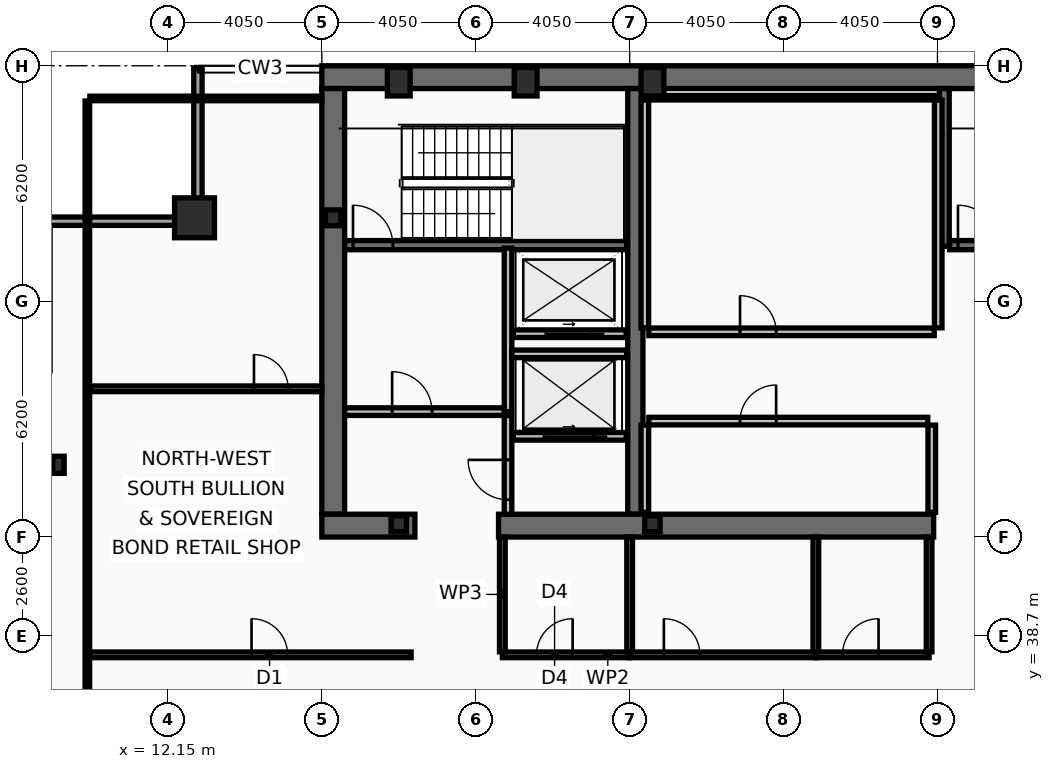
"""IFC4 building model, lengths in metres.
Left out: names, types, materials, properties, quantities, classifications, styles, units other than length and angle.
Written with IfcOpenShell. Run it as: python <this file> out.ifc"""

import sys

from ifc_helpers import new_model, si_unit, direction, frame, frame_2d, origin, origin_2d, place, context, subcontext, project, spatial, rectangle, hollow_rectangle, i_section, extrude, element, fill, save


model = new_model("IFC4")
c1 = context("Model", 3, precision=1e-05, world=origin(), true_north=direction((0.0, 1.0)))
c2 = subcontext(c1, "Body", "Model", "MODEL_VIEW")
j1 = project(units=[si_unit("LENGTHUNIT", "METRE"), si_unit("PLANEANGLEUNIT", "RADIAN")], contexts=[c1])
p1 = place(None, origin())
s1 = spatial("IfcSite", under=j1, at=p1, CompositionType="ELEMENT")
p2 = place(p1, origin())
s2 = spatial("IfcBuilding", under=s1, at=p2, CompositionType="ELEMENT")
p3 = place(p2, frame((0.0, 0.0, 249.8)))
s3 = spatial("IfcBuildingStorey", under=s2, at=p3, CompositionType="ELEMENT", Elevation=249.8)
p4 = place(p3, frame((16.2, 53.4, 0.0), z_axis=(0.0, 0.0, 1.0), x_axis=(1.0, 0.0, 0.0)))
e1 = element("IfcWall", 1, at=p4, inside=s3, PredefinedType="SHEAR", context=c2, shape_type="SweptSolid", body=[
    extrude(rectangle(XDim=40.5, YDim=0.6, at=frame_2d((20.25, 0.0))), origin(), (0.0, 0.0, 1.0), 3.44),
])
p5 = place(p3, frame((16.5, 41.9, 0.0), z_axis=(0.0, 0.0, 1.0), x_axis=(0.0, 1.0, 0.0)))
e2 = element("IfcWall", 2, at=p5, inside=s3, PredefinedType="SHEAR", context=c2, shape_type="SweptSolid", body=[
    extrude(rectangle(XDim=11.2, YDim=0.6, at=frame_2d((5.6, 0.0))), origin(), (0.0, 0.0, 1.0), 3.44),
])
p6 = place(p3, frame((24.45, 41.9, 0.0), z_axis=(0.0, 0.0, 1.0), x_axis=(0.0, 1.0, 0.0)))
e3 = element("IfcWall", 3, at=p6, inside=s3, PredefinedType="SHEAR", context=c2, shape_type="SweptSolid", body=[
    extrude(rectangle(XDim=11.2, YDim=0.4, at=frame_2d((5.6, 0.0))), origin(), (0.0, 0.0, 1.0), 3.44),
])
p7 = place(p3, frame((18.65, 41.6, 0.0), z_axis=(0.0, 0.0, 1.0), x_axis=(-1.0, 0.0, 0.0)))
e4 = element("IfcWall", 4, at=p7, inside=s3, PredefinedType="SHEAR", context=c2, shape_type="SweptSolid", body=[
    extrude(rectangle(XDim=2.45, YDim=0.6, at=frame_2d((1.225, 0.0))), origin(), (0.0, 0.0, 1.0), 3.44),
])
p8 = place(p3, frame((32.3, 41.6, 0.0), z_axis=(0.0, 0.0, 1.0), x_axis=(-1.0, 0.0, 0.0)))
e5 = element("IfcWall", 5, at=p8, inside=s3, PredefinedType="SHEAR", context=c2, shape_type="SweptSolid", body=[
    extrude(rectangle(XDim=11.45, YDim=0.6, at=frame_2d((5.725, 0.0))), origin(), (0.0, 0.0, 1.0), 3.44),
])
p9 = place(p3, frame((32.58, 48.95, 0.0), z_axis=(0.0, 0.0, 1.0), x_axis=(0.0, 1.0, 0.0)))
e6 = element("IfcWall", 6, at=p9, inside=s3, PredefinedType="SHEAR", context=c2, shape_type="SweptSolid", body=[
    extrude(rectangle(XDim=4.15, YDim=0.26, at=frame_2d((2.075, 0.0))), origin(), (0.0, 0.0, 1.0), 3.44),
])
p10 = place(p3, frame((16.8, 48.98, 0.0), z_axis=(0.0, 0.0, 1.0), x_axis=(1.0, 0.0, 0.0)))
e7 = element("IfcWall", 7, at=p10, inside=s3, PredefinedType="SHEAR", context=c2, shape_type="SweptSolid", body=[
    extrude(rectangle(XDim=7.42, YDim=0.24, at=frame_2d((3.71, 0.0))), origin(), (0.0, 0.0, 1.0), 3.44),
])
p11 = place(p10, frame((0.22, 0.0, 0.0)))
e8 = element("IfcOpeningElement", 8, at=p11, cuts=e7, PredefinedType="OPENING", context=c2, shape_type="SweptSolid", body=[
    extrude(rectangle(XDim=1.05, YDim=2.15, at=frame_2d((0.525, 1.075))), frame((0.0, 0.13, 0.0), z_axis=(0.0, -1.0, 0.0), x_axis=(1.0, 0.0, 0.0)), (0.0, 0.0, 1.0), 0.26),
])
p12 = place(p3, frame((32.72, 48.98, 0.0), z_axis=(0.0, 0.0, 1.0), x_axis=(1.0, 0.0, 0.0)))
e9 = element("IfcWall", 9, at=p12, inside=s3, PredefinedType="SHEAR", context=c2, shape_type="SweptSolid", body=[
    extrude(rectangle(XDim=7.56, YDim=0.24, at=frame_2d((3.78, 0.0))), origin(), (0.0, 0.0, 1.0), 3.44),
])
p13 = place(p12, frame((0.22, 0.0, 0.0)))
e10 = element("IfcOpeningElement", 10, at=p13, cuts=e9, PredefinedType="OPENING", context=c2, shape_type="SweptSolid", body=[
    extrude(rectangle(XDim=1.05, YDim=2.15, at=frame_2d((0.525, 1.075))), frame((0.0, 0.13, 0.0), z_axis=(0.0, -1.0, 0.0), x_axis=(1.0, 0.0, 0.0)), (0.0, 0.0, 1.0), 0.26),
])
p14 = place(p3, frame((12.85, 49.7, 0.0), z_axis=(0.0, 0.0, 1.0), x_axis=(1.0, 0.0, 0.0)))
e11 = element("IfcColumn", 11, at=p14, inside=s3, PredefinedType="COLUMN", context=c2, shape_type="SweptSolid", body=[
    extrude(hollow_rectangle(XDim=1.05, YDim=1.05, WallThickness=0.055, at=origin_2d()), origin(), (0.0, 0.0, 1.0), 3.6),
])
for number, where, z_axis, x_axis in (
    (12, (18.225, 53.28, 0.0), (0.0, 0.0, 1.0), (1.0, 0.0, 0.0)),
    (13, (21.562, 53.28, 0.0), (0.0, 0.0, 1.0), (1.0, 0.0, 0.0)),
    (14, (24.9, 53.28, 0.0), (0.0, 0.0, 1.0), (1.0, 0.0, 0.0)),
):
    element("IfcColumn", number, at=place(p3, frame(where, z_axis=z_axis, x_axis=x_axis)), inside=s3, PredefinedType="COLUMN", context=c2, shape_type="SweptSolid", body=[
        extrude(hollow_rectangle(XDim=0.6, YDim=0.75, WallThickness=0.045, at=origin_2d()), origin(), (0.0, 0.0, 1.0), 3.6),
    ])
p15 = place(p3, frame((9.27, 43.2, 0.0), z_axis=(0.0, 0.0, 1.0), x_axis=(1.0, 0.0, 0.0)))
e15 = element("IfcColumn", 15, at=p15, inside=s3, PredefinedType="COLUMN", context=c2, shape_type="SweptSolid", body=[
    extrude(i_section(OverallWidth=0.3, OverallDepth=0.45, WebThickness=0.014, FlangeThickness=0.026, at=origin_2d()), origin(), (0.0, 0.0, 1.0), 3.6),
])
for number, where, z_axis, x_axis in (
    (16, (16.5, 49.7, 0.0), (0.0, 0.0, 1.0), (1.0, 0.0, 0.0)),
    (17, (18.225, 41.65, 0.0), (0.0, 0.0, 1.0), (1.0, 0.0, 0.0)),
    (18, (24.9, 41.65, 0.0), (0.0, 0.0, 1.0), (1.0, 0.0, 0.0)),
):
    element("IfcColumn", number, at=place(p3, frame(where, z_axis=z_axis, x_axis=x_axis)), inside=s3, PredefinedType="COLUMN", context=c2, shape_type="SweptSolid", body=[
        extrude(i_section(OverallWidth=0.406, OverallDepth=0.416, WebThickness=0.03, FlangeThickness=0.048, at=origin_2d()), origin(), (0.0, 0.0, 1.0), 3.6),
    ])
p16 = place(p3, frame((8.83, 49.61, 0.0), z_axis=(0.0, 0.0, 1.0), x_axis=(1.0, 0.0, 0.0)))
e19 = element("IfcWall", 19, at=p16, inside=s3, PredefinedType="SOLIDWALL", context=c2, shape_type="SweptSolid", body=[
    extrude(rectangle(XDim=4.22, YDim=0.22, at=frame_2d((2.11, 0.0))), origin(), (0.0, 0.0, 1.0), 2.83),
])
p17 = place(p3, frame((12.94, 49.72, 0.0), z_axis=(0.0, 0.0, 1.0), x_axis=(0.0, 1.0, 0.0)))
e20 = element("IfcWall", 20, at=p17, inside=s3, PredefinedType="SOLIDWALL", context=c2, shape_type="SweptSolid", body=[
    extrude(rectangle(XDim=3.91, YDim=0.22, at=frame_2d((1.955, 0.0))), origin(), (0.0, 0.0, 1.0), 2.83),
])
p18 = place(p3, frame((24.21, 43.95, 0.0), z_axis=(0.0, 0.0, 1.0), x_axis=(-1.0, 0.0, 0.0)))
e21 = element("IfcWall", 21, at=p18, inside=s3, PredefinedType="PARTITIONING", context=c2, shape_type="SweptSolid", body=[
    extrude(rectangle(XDim=2.97, YDim=0.2, at=frame_2d((1.485, 0.0))), origin(), (0.0, 0.0, 1.0), 3.44),
])
p19 = place(p18, frame((0.86, 0.0, 0.0)))
e22 = element("IfcOpeningElement", 22, at=p19, cuts=e21, PredefinedType="OPENING", context=c2, shape_type="SweptSolid", body=[
    extrude(rectangle(XDim=1.3, YDim=2.18, at=frame_2d((0.65, 1.09))), frame((0.0, 0.11, 0.0), z_axis=(0.0, -1.0, 0.0), x_axis=(1.0, 0.0, 0.0)), (0.0, 0.0, 1.0), 0.22),
])
p20 = place(p3, frame((24.21, 46.65, 0.0), z_axis=(0.0, 0.0, 1.0), x_axis=(-1.0, 0.0, 0.0)))
e23 = element("IfcWall", 23, at=p20, inside=s3, PredefinedType="PARTITIONING", context=c2, shape_type="SweptSolid", body=[
    extrude(rectangle(XDim=2.97, YDim=0.2, at=frame_2d((1.485, 0.0))), origin(), (0.0, 0.0, 1.0), 3.44),
])
p21 = place(p20, frame((0.91, 0.0, 0.0)))
e24 = element("IfcOpeningElement", 24, at=p21, cuts=e23, PredefinedType="OPENING", context=c2, shape_type="SweptSolid", body=[
    extrude(rectangle(XDim=1.2, YDim=2.18, at=frame_2d((0.6, 1.09))), frame((0.0, 0.11, 0.0), z_axis=(0.0, -1.0, 0.0), x_axis=(1.0, 0.0, 0.0)), (0.0, 0.0, 1.0), 0.22),
])
p22 = place(p3, frame((21.1, 44.6, 0.0), z_axis=(0.0, 0.0, 1.0), x_axis=(0.0, 1.0, 0.0)))
e25 = element("IfcWall", 25, at=p22, inside=s3, PredefinedType="PARTITIONING", context=c2, shape_type="SweptSolid", body=[
    extrude(rectangle(XDim=4.3, YDim=0.2, at=frame_2d((2.15, 0.0))), origin(), (0.0, 0.0, 1.0), 3.44),
])
p23 = place(p3, frame((16.8, 44.6, 0.0), z_axis=(0.0, 0.0, 1.0), x_axis=(1.0, 0.0, 0.0)))
e26 = element("IfcWall", 26, at=p23, inside=s3, PredefinedType="PARTITIONING", context=c2, shape_type="SweptSolid", body=[
    extrude(rectangle(XDim=4.2, YDim=0.2, at=frame_2d((2.1, 0.0))), origin(), (0.0, 0.0, 1.0), 3.44),
])
p24 = place(p23, frame((1.25, 0.0, 0.0)))
e27 = element("IfcOpeningElement", 27, at=p24, cuts=e26, PredefinedType="OPENING", context=c2, shape_type="SweptSolid", body=[
    extrude(rectangle(XDim=1.05, YDim=2.15, at=frame_2d((0.525, 1.075))), frame((0.0, 0.11, 0.0), z_axis=(0.0, -1.0, 0.0), x_axis=(1.0, 0.0, 0.0)), (0.0, 0.0, 1.0), 0.22),
])
p25 = place(p3, frame((21.2, 46.12, 0.0), z_axis=(0.0, 0.0, 1.0), x_axis=(1.0, 0.0, 0.0)))
e28 = element("IfcWall", 28, at=p25, inside=s3, PredefinedType="PARTITIONING", context=c2, shape_type="SweptSolid", body=[
    extrude(rectangle(XDim=3.02, YDim=0.2, at=frame_2d((1.51, 0.0))), origin(), (0.0, 0.0, 1.0), 3.44),
])
p26 = place(p3, frame((21.1, 41.9, 0.0), z_axis=(0.0, 0.0, 1.0), x_axis=(0.0, 1.0, 0.0)))
e29 = element("IfcWall", 29, at=p26, inside=s3, PredefinedType="PARTITIONING", context=c2, shape_type="SweptSolid", body=[
    extrude(rectangle(XDim=2.595, YDim=0.2, at=frame_2d((1.298, 0.0))), origin(), (0.0, 0.0, 1.0), 3.44),
])
p27 = place(p26, frame((0.38, 0.0, 0.0)))
e30 = element("IfcOpeningElement", 30, at=p27, cuts=e29, PredefinedType="OPENING", context=c2, shape_type="SweptSolid", body=[
    extrude(rectangle(XDim=1.05, YDim=2.15, at=frame_2d((0.525, 1.075))), frame((0.0, 0.11, 0.0), z_axis=(0.0, -1.0, 0.0), x_axis=(1.0, 0.0, 0.0)), (0.0, 0.0, 1.0), 0.22),
])
for number, where, z_axis, x_axis in (
    (31, (24.7, 46.805, 0.0), (0.0, 0.0, 1.0), (0.0, 1.0, 0.0)),
    (32, (32.42, 46.805, 0.0), (0.0, 0.0, 1.0), (0.0, 1.0, 0.0)),
):
    element("IfcWall", number, at=place(p3, frame(where, z_axis=z_axis, x_axis=x_axis)), inside=s3, PredefinedType="PARTITIONING", context=c2, shape_type="SweptSolid", body=[
        extrude(rectangle(XDim=5.99, YDim=0.2, at=frame_2d((2.995, 0.0))), origin(), (0.0, 0.0, 1.0), 3.44),
    ])
p28 = place(p3, frame((24.805, 52.86, 0.0), z_axis=(0.0, 0.0, 1.0), x_axis=(1.0, 0.0, 0.0)))
e33 = element("IfcWall", 33, at=p28, inside=s3, PredefinedType="PARTITIONING", context=c2, shape_type="SweptSolid", body=[
    extrude(rectangle(XDim=7.51, YDim=0.12, at=frame_2d((3.755, 0.0))), origin(), (0.0, 0.0, 1.0), 3.44),
])
p29 = place(p3, frame((24.805, 46.7, 0.0), z_axis=(0.0, 0.0, 1.0), x_axis=(1.0, 0.0, 0.0)))
e34 = element("IfcWall", 34, at=p29, inside=s3, PredefinedType="PARTITIONING", context=c2, shape_type="SweptSolid", body=[
    extrude(rectangle(XDim=7.51, YDim=0.2, at=frame_2d((3.755, 0.0))), origin(), (0.0, 0.0, 1.0), 3.44),
])
p30 = place(p29, frame((2.4, 0.0, 0.0)))
e35 = element("IfcOpeningElement", 35, at=p30, cuts=e34, PredefinedType="OPENING", context=c2, shape_type="SweptSolid", body=[
    extrude(rectangle(XDim=0.95, YDim=2.1, at=frame_2d((0.475, 1.05))), frame((0.0, 0.11, 0.0), z_axis=(0.0, -1.0, 0.0), x_axis=(1.0, 0.0, 0.0)), (0.0, 0.0, 1.0), 0.22),
])
for number, where, z_axis, x_axis in (
    (36, (24.7, 41.95, 0.0), (0.0, 0.0, 1.0), (0.0, 1.0, 0.0)),
    (37, (32.25, 41.95, 0.0), (0.0, 0.0, 1.0), (0.0, 1.0, 0.0)),
):
    element("IfcWall", number, at=place(p3, frame(where, z_axis=z_axis, x_axis=x_axis)), inside=s3, PredefinedType="PARTITIONING", context=c2, shape_type="SweptSolid", body=[
        extrude(rectangle(XDim=2.295, YDim=0.2, at=frame_2d((1.147, 0.0))), origin(), (0.0, 0.0, 1.0), 3.44),
    ])
p31 = place(p3, frame((24.805, 44.35, 0.0), z_axis=(0.0, 0.0, 1.0), x_axis=(1.0, 0.0, 0.0)))
e38 = element("IfcWall", 38, at=p31, inside=s3, PredefinedType="PARTITIONING", context=c2, shape_type="SweptSolid", body=[
    extrude(rectangle(XDim=7.34, YDim=0.2, at=frame_2d((3.67, 0.0))), origin(), (0.0, 0.0, 1.0), 3.44),
])
p32 = place(p31, frame((2.4, 0.0, 0.0)))
e39 = element("IfcOpeningElement", 39, at=p32, cuts=e38, PredefinedType="OPENING", context=c2, shape_type="SweptSolid", body=[
    extrude(rectangle(XDim=0.95, YDim=2.1, at=frame_2d((0.475, 1.05))), frame((0.0, 0.11, 0.0), z_axis=(0.0, -1.0, 0.0), x_axis=(1.0, 0.0, 0.0)), (0.0, 0.0, 1.0), 0.22),
])
p33 = place(p3, frame((20.95, 38.2, 0.0), z_axis=(0.0, 0.0, 1.0), x_axis=(1.0, 0.0, 0.0)))
e40 = element("IfcWall", 40, at=p33, inside=s3, PredefinedType="PARTITIONING", context=c2, shape_type="SweptSolid", body=[
    extrude(rectangle(XDim=3.35, YDim=0.15, at=frame_2d((1.675, 0.0))), origin(), (0.0, 0.0, 1.0), 3.44),
])
p34 = place(p33, frame((0.9, 0.0, 0.0)))
e41 = element("IfcOpeningElement", 41, at=p34, cuts=e40, PredefinedType="OPENING", context=c2, shape_type="SweptSolid", body=[
    extrude(rectangle(XDim=0.95, YDim=2.05, at=frame_2d((0.475, 1.025))), frame((0.0, 0.085, 0.0), z_axis=(0.0, -1.0, 0.0), x_axis=(1.0, 0.0, 0.0)), (0.0, 0.0, 1.0), 0.17),
])
p35 = place(p3, frame((24.3, 38.2, 0.0), z_axis=(0.0, 0.0, 1.0), x_axis=(1.0, 0.0, 0.0)))
e42 = element("IfcWall", 42, at=p35, inside=s3, PredefinedType="PARTITIONING", context=c2, shape_type="SweptSolid", body=[
    extrude(rectangle(XDim=4.9, YDim=0.15, at=frame_2d((2.45, 0.0))), origin(), (0.0, 0.0, 1.0), 2.78),
])
p36 = place(p35, frame((0.9, 0.0, 0.0)))
e43 = element("IfcOpeningElement", 43, at=p36, cuts=e42, PredefinedType="OPENING", context=c2, shape_type="SweptSolid", body=[
    extrude(rectangle(XDim=0.95, YDim=2.05, at=frame_2d((0.475, 1.025))), frame((0.0, 0.085, 0.0), z_axis=(0.0, -1.0, 0.0), x_axis=(1.0, 0.0, 0.0)), (0.0, 0.0, 1.0), 0.17),
])
p37 = place(p3, frame((29.2, 38.2, 0.0), z_axis=(0.0, 0.0, 1.0), x_axis=(1.0, 0.0, 0.0)))
e44 = element("IfcWall", 44, at=p37, inside=s3, PredefinedType="PARTITIONING", context=c2, shape_type="SweptSolid", body=[
    extrude(rectangle(XDim=2.98, YDim=0.15, at=frame_2d((1.49, 0.0))), origin(), (0.0, 0.0, 1.0), 2.78),
])
p38 = place(p37, frame((0.7, 0.0, 0.0)))
e45 = element("IfcOpeningElement", 45, at=p38, cuts=e44, PredefinedType="OPENING", context=c2, shape_type="SweptSolid", body=[
    extrude(rectangle(XDim=0.95, YDim=2.05, at=frame_2d((0.475, 1.025))), frame((0.0, 0.085, 0.0), z_axis=(0.0, -1.0, 0.0), x_axis=(1.0, 0.0, 0.0)), (0.0, 0.0, 1.0), 0.17),
])
for number, where, z_axis, x_axis in (
    (46, (20.95, 38.28, 0.0), (0.0, 0.0, 1.0), (0.0, 1.0, 0.0)),
    (47, (24.3, 38.28, 0.0), (0.0, 0.0, 1.0), (0.0, 1.0, 0.0)),
    (48, (29.2, 38.28, 0.0), (0.0, 0.0, 1.0), (0.0, 1.0, 0.0)),
    (49, (32.18, 38.28, 0.0), (0.0, 0.0, 1.0), (0.0, 1.0, 0.0)),
):
    element("IfcWall", number, at=place(p3, frame(where, z_axis=z_axis, x_axis=x_axis)), inside=s3, PredefinedType="PARTITIONING", context=c2, shape_type="SweptSolid", body=[
        extrude(rectangle(XDim=3.02, YDim=0.15, at=frame_2d((1.51, 0.0))), origin(), (0.0, 0.0, 1.0), 3.44),
    ])
p39 = place(p3, frame((10.03, 38.2, 0.0), z_axis=(0.0, 0.0, 1.0), x_axis=(1.0, 0.0, 0.0)))
e50 = element("IfcWall", 50, at=p39, inside=s3, PredefinedType="PARTITIONING", context=c2, shape_type="SweptSolid", body=[
    extrude(rectangle(XDim=8.52, YDim=0.15, at=frame_2d((4.26, 0.0))), origin(), (0.0, 0.0, 1.0), 2.78),
])
p40 = place(p39, frame((4.32, 0.0, 0.0)))
e51 = element("IfcOpeningElement", 51, at=p40, cuts=e50, PredefinedType="OPENING", context=c2, shape_type="SweptSolid", body=[
    extrude(rectangle(XDim=0.95, YDim=2.05, at=frame_2d((0.475, 1.025))), frame((0.0, 0.085, 0.0), z_axis=(0.0, -1.0, 0.0), x_axis=(1.0, 0.0, 0.0)), (0.0, 0.0, 1.0), 0.17),
])
p41 = place(p3, frame((10.095, 45.2, 0.0), z_axis=(0.0, 0.0, 1.0), x_axis=(1.0, 0.0, 0.0)))
e52 = element("IfcWall", 52, at=p41, inside=s3, PredefinedType="PARTITIONING", context=c2, shape_type="SweptSolid", body=[
    extrude(rectangle(XDim=6.105, YDim=0.15, at=frame_2d((3.052, 0.0))), origin(), (0.0, 0.0, 1.0), 2.83),
])
p42 = place(p41, frame((4.32, 0.0, 0.0)))
e53 = element("IfcOpeningElement", 53, at=p42, cuts=e52, PredefinedType="OPENING", context=c2, shape_type="SweptSolid", body=[
    extrude(rectangle(XDim=0.9, YDim=2.05, at=frame_2d((0.45, 1.025))), frame((0.0, 0.085, 0.0), z_axis=(0.0, -1.0, 0.0), x_axis=(1.0, 0.0, 0.0)), (0.0, 0.0, 1.0), 0.17),
])
p43 = place(p3, frame((10.03, 10.665, 0.0), z_axis=(0.0, 0.0, 1.0), x_axis=(0.0, 1.0, 0.0)))
e54 = element("IfcWall", 54, at=p43, inside=s3, PredefinedType="PARTITIONING", context=c2, shape_type="SweptSolid", body=[
    extrude(rectangle(XDim=42.11, YDim=0.12, at=frame_2d((21.055, 0.0))), origin(), (0.0, 0.0, 1.0), 2.78),
])
p44 = place(p3, frame((10.095, 52.84, 0.0), z_axis=(0.0, 0.0, 1.0), x_axis=(1.0, 0.0, 0.0)))
e55 = element("IfcWall", 55, at=p44, inside=s3, PredefinedType="PARTITIONING", context=c2, shape_type="SweptSolid", body=[
    extrude(rectangle(XDim=6.105, YDim=0.12, at=frame_2d((3.052, 0.0))), origin(), (0.0, 0.0, 1.0), 3.44),
])
p45 = place(p11, origin())
e56 = element("IfcDoor", 56, at=p45, inside=s3, OperationType="SINGLE_SWING_LEFT", PredefinedType="DOOR", context=c2, shape_type="SweptSolid", body=[
    extrude(rectangle(XDim=1.05, YDim=2.15, at=frame_2d((0.525, 1.075))), frame((0.0, 0.025, 0.0), z_axis=(0.0, -1.0, 0.0), x_axis=(1.0, 0.0, 0.0)), (0.0, 0.0, 1.0), 0.05),
])
fill(e8, e56)
p46 = place(p13, origin())
e57 = element("IfcDoor", 57, at=p46, inside=s3, OperationType="SINGLE_SWING_LEFT", PredefinedType="DOOR", context=c2, shape_type="SweptSolid", body=[
    extrude(rectangle(XDim=1.05, YDim=2.15, at=frame_2d((0.525, 1.075))), frame((0.0, 0.025, 0.0), z_axis=(0.0, -1.0, 0.0), x_axis=(1.0, 0.0, 0.0)), (0.0, 0.0, 1.0), 0.05),
])
fill(e10, e57)
p47 = place(p19, origin())
e58 = element("IfcDoor", 58, at=p47, inside=s3, OperationType="SLIDING_TO_LEFT", PredefinedType="DOOR", context=c2, shape_type="SweptSolid", body=[
    extrude(rectangle(XDim=1.3, YDim=2.18, at=frame_2d((0.65, 1.09))), frame((0.0, 0.025, 0.0), z_axis=(0.0, -1.0, 0.0), x_axis=(1.0, 0.0, 0.0)), (0.0, 0.0, 1.0), 0.05),
])
fill(e22, e58)
p48 = place(p21, origin())
e59 = element("IfcDoor", 59, at=p48, inside=s3, OperationType="SLIDING_TO_LEFT", PredefinedType="DOOR", context=c2, shape_type="SweptSolid", body=[
    extrude(rectangle(XDim=1.2, YDim=2.18, at=frame_2d((0.6, 1.09))), frame((0.0, 0.025, 0.0), z_axis=(0.0, -1.0, 0.0), x_axis=(1.0, 0.0, 0.0)), (0.0, 0.0, 1.0), 0.05),
])
fill(e24, e59)
p49 = place(p24, origin())
e60 = element("IfcDoor", 60, at=p49, inside=s3, OperationType="SINGLE_SWING_LEFT", PredefinedType="DOOR", context=c2, shape_type="SweptSolid", body=[
    extrude(rectangle(XDim=1.05, YDim=2.15, at=frame_2d((0.525, 1.075))), frame((0.0, 0.025, 0.0), z_axis=(0.0, -1.0, 0.0), x_axis=(1.0, 0.0, 0.0)), (0.0, 0.0, 1.0), 0.05),
])
fill(e27, e60)
p50 = place(p27, origin())
e61 = element("IfcDoor", 61, at=p50, inside=s3, OperationType="SINGLE_SWING_RIGHT", PredefinedType="DOOR", context=c2, shape_type="SweptSolid", body=[
    extrude(rectangle(XDim=1.05, YDim=2.15, at=frame_2d((0.525, 1.075))), frame((0.0, 0.025, 0.0), z_axis=(0.0, -1.0, 0.0), x_axis=(1.0, 0.0, 0.0)), (0.0, 0.0, 1.0), 0.05),
])
fill(e30, e61)
p51 = place(p30, origin())
e62 = element("IfcDoor", 62, at=p51, inside=s3, OperationType="SINGLE_SWING_LEFT", PredefinedType="DOOR", context=c2, shape_type="SweptSolid", body=[
    extrude(rectangle(XDim=0.95, YDim=2.1, at=frame_2d((0.475, 1.05))), frame((0.0, 0.025, 0.0), z_axis=(0.0, -1.0, 0.0), x_axis=(1.0, 0.0, 0.0)), (0.0, 0.0, 1.0), 0.05),
])
fill(e35, e62)
p52 = place(p32, origin())
e63 = element("IfcDoor", 63, at=p52, inside=s3, OperationType="SINGLE_SWING_RIGHT", PredefinedType="DOOR", context=c2, shape_type="SweptSolid", body=[
    extrude(rectangle(XDim=0.95, YDim=2.1, at=frame_2d((0.475, 1.05))), frame((0.0, 0.025, 0.0), z_axis=(0.0, -1.0, 0.0), x_axis=(1.0, 0.0, 0.0)), (0.0, 0.0, 1.0), 0.05),
])
fill(e39, e63)
p53 = place(p34, origin())
e64 = element("IfcDoor", 64, at=p53, inside=s3, OperationType="SINGLE_SWING_RIGHT", PredefinedType="DOOR", context=c2, shape_type="SweptSolid", body=[
    extrude(rectangle(XDim=0.95, YDim=2.05, at=frame_2d((0.475, 1.025))), frame((0.0, 0.025, 0.0), z_axis=(0.0, -1.0, 0.0), x_axis=(1.0, 0.0, 0.0)), (0.0, 0.0, 1.0), 0.05),
])
fill(e41, e64)
p54 = place(p36, origin())
e65 = element("IfcDoor", 65, at=p54, inside=s3, OperationType="SINGLE_SWING_LEFT", PredefinedType="DOOR", context=c2, shape_type="SweptSolid", body=[
    extrude(rectangle(XDim=0.95, YDim=2.05, at=frame_2d((0.475, 1.025))), frame((0.0, 0.025, 0.0), z_axis=(0.0, -1.0, 0.0), x_axis=(1.0, 0.0, 0.0)), (0.0, 0.0, 1.0), 0.05),
])
fill(e43, e65)
p55 = place(p38, origin())
e66 = element("IfcDoor", 66, at=p55, inside=s3, OperationType="SINGLE_SWING_RIGHT", PredefinedType="DOOR", context=c2, shape_type="SweptSolid", body=[
    extrude(rectangle(XDim=0.95, YDim=2.05, at=frame_2d((0.475, 1.025))), frame((0.0, 0.025, 0.0), z_axis=(0.0, -1.0, 0.0), x_axis=(1.0, 0.0, 0.0)), (0.0, 0.0, 1.0), 0.05),
])
fill(e45, e66)
p56 = place(p40, origin())
e67 = element("IfcDoor", 67, at=p56, inside=s3, OperationType="SINGLE_SWING_LEFT", PredefinedType="DOOR", context=c2, shape_type="SweptSolid", body=[
    extrude(rectangle(XDim=0.95, YDim=2.05, at=frame_2d((0.475, 1.025))), frame((0.0, 0.025, 0.0), z_axis=(0.0, -1.0, 0.0), x_axis=(1.0, 0.0, 0.0)), (0.0, 0.0, 1.0), 0.05),
])
fill(e51, e67)
p57 = place(p42, origin())
e68 = element("IfcDoor", 68, at=p57, inside=s3, OperationType="SINGLE_SWING_LEFT", PredefinedType="DOOR", context=c2, shape_type="SweptSolid", body=[
    extrude(rectangle(XDim=0.9, YDim=2.05, at=frame_2d((0.45, 1.025))), frame((0.0, 0.025, 0.0), z_axis=(0.0, -1.0, 0.0), x_axis=(1.0, 0.0, 0.0)), (0.0, 0.0, 1.0), 0.05),
])
fill(e53, e68)
save(model, sys.argv[1])
